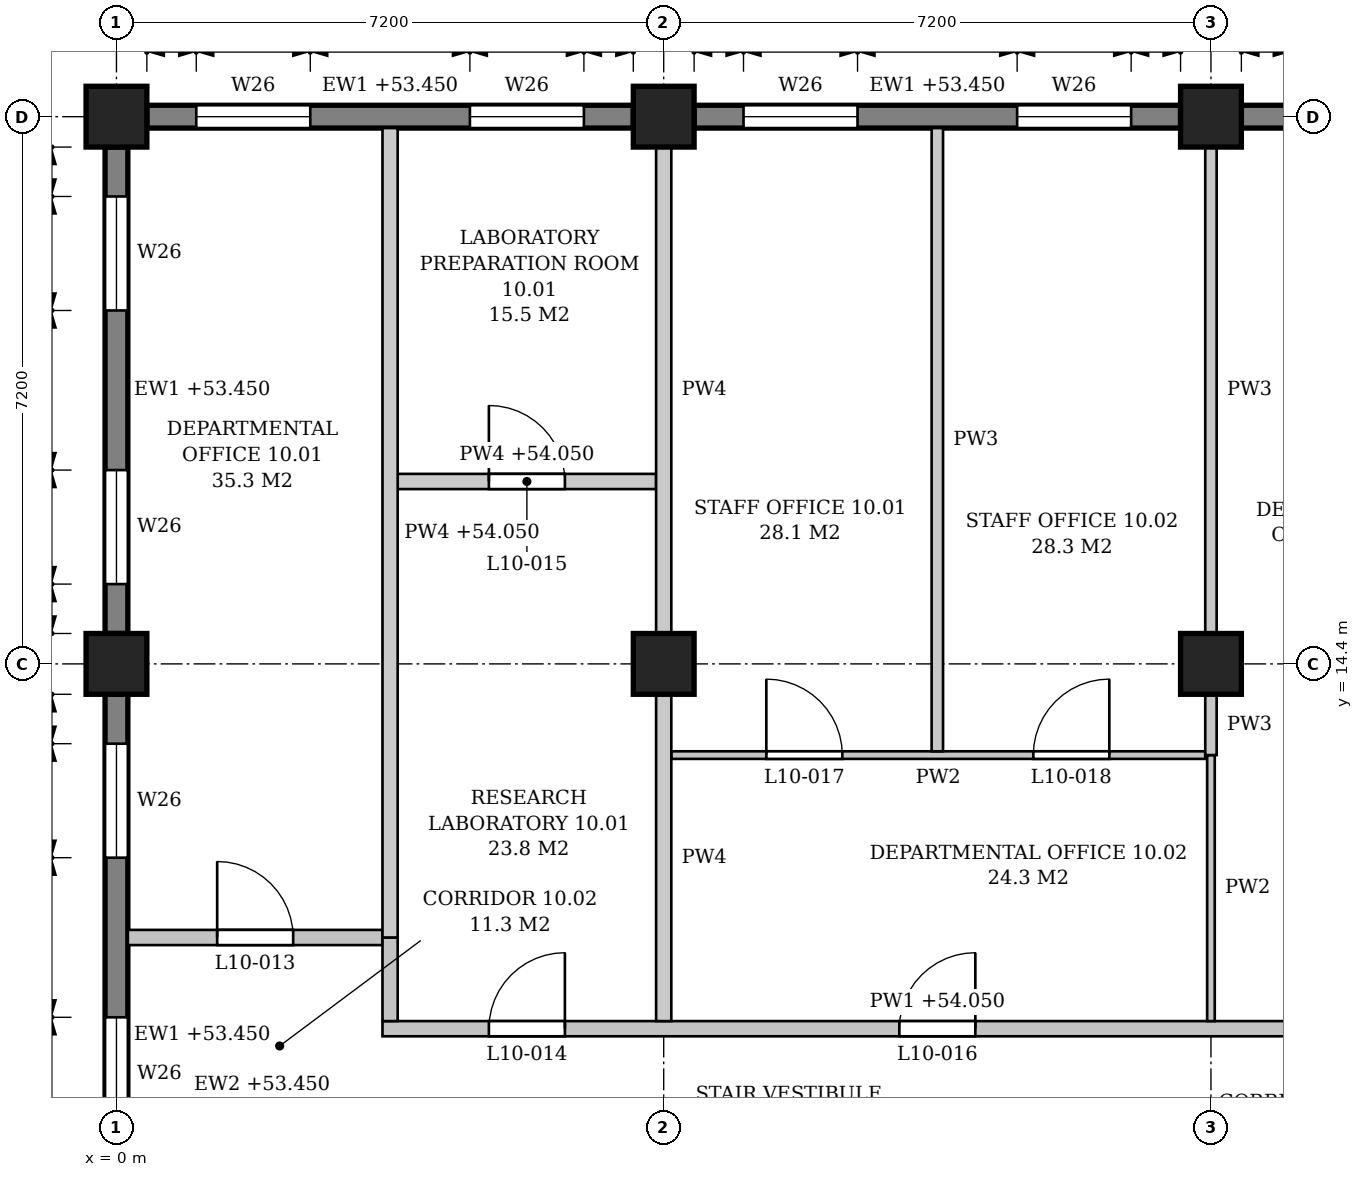
"""IFC4 building model, lengths in metres.
Left out: names, types, materials, properties, quantities, classifications, styles, units other than length and angle.
Written with IfcOpenShell. Run it as: python <this file> out.ifc"""

import sys

from ifc_helpers import new_model, si_unit, direction, frame, frame_2d, origin, origin_2d, place, context, subcontext, project, spatial, polyline, rectangle, outline, extrude, element, fill, save


model = new_model("IFC4")
c1 = context("Model", 3, precision=1e-05, world=origin(), true_north=direction((0.0, 1.0)))
c2 = subcontext(c1, "Body", "Model", "MODEL_VIEW")
j1 = project(units=[si_unit("LENGTHUNIT", "METRE"), si_unit("PLANEANGLEUNIT", "RADIAN")], contexts=[c1])
p1 = place(None, origin())
s1 = spatial("IfcSite", under=j1, at=p1, CompositionType="ELEMENT")
p2 = place(p1, origin())
s2 = spatial("IfcBuilding", under=s1, at=p2, CompositionType="ELEMENT")
p3 = place(p2, frame((0.0, 0.0, 49.8)))
s3 = spatial("IfcBuildingStorey", under=s2, at=p3, CompositionType="ELEMENT", Elevation=49.8)
for number, where, z_axis, x_axis in (
    (1, (0.0, 14.4, 0.0), (0.0, 0.0, 1.0), (1.0, 0.0, 0.0)),
    (2, (0.0, 21.6, 0.0), (0.0, 0.0, 1.0), (1.0, 0.0, 0.0)),
    (3, (7.2, 14.4, 0.0), (0.0, 0.0, 1.0), (1.0, 0.0, 0.0)),
    (4, (7.2, 21.6, 0.0), (0.0, 0.0, 1.0), (1.0, 0.0, 0.0)),
    (5, (14.4, 14.4, 0.0), (0.0, 0.0, 1.0), (1.0, 0.0, 0.0)),
    (6, (14.4, 21.6, 0.0), (0.0, 0.0, 1.0), (1.0, 0.0, 0.0)),
):
    element("IfcColumn", number, at=place(p3, frame(where, z_axis=z_axis, x_axis=x_axis)), inside=s3, PredefinedType="COLUMN", context=c2, shape_type="SweptSolid", body=[
        extrude(rectangle(XDim=0.8, YDim=0.8, at=origin_2d()), origin(), (0.0, 0.0, 1.0), 4.5),
    ])
p4 = place(p3, frame((0.0, 7.6, 0.0), z_axis=(0.0, 0.0, 1.0), x_axis=(0.0, 1.0, 0.0)))
e7 = element("IfcWall", 7, at=p4, inside=s3, PredefinedType="STANDARD", context=c2, shape_type="SweptSolid", body=[
    extrude(rectangle(XDim=6.4, YDim=0.3, at=frame_2d((3.2, 0.0))), origin(), (0.0, 0.0, 1.0), 3.65),
])
p5 = place(p4, frame((0.65, 0.0, 0.9)))
e8 = element("IfcOpeningElement", 8, at=p5, cuts=e7, PredefinedType="OPENING", context=c2, shape_type="SweptSolid", body=[
    extrude(outline(polyline([(0.0, 0.0), (1.5, 0.0), (1.5, 1.85), (0.75, 2.6), (0.0, 1.85), (0.0, 0.0)])), frame((0.0, 0.16, 0.0), z_axis=(0.0, -1.0, 0.0), x_axis=(1.0, 0.0, 0.0)), (0.0, 0.0, 1.0), 0.32),
])
p6 = place(p4, frame((4.25, 0.0, 0.9)))
e9 = element("IfcOpeningElement", 9, at=p6, cuts=e7, PredefinedType="OPENING", context=c2, shape_type="SweptSolid", body=[
    extrude(outline(polyline([(0.0, 0.0), (1.5, 0.0), (1.5, 1.85), (0.75, 2.6), (0.0, 1.85), (0.0, 0.0)])), frame((0.0, 0.16, 0.0), z_axis=(0.0, -1.0, 0.0), x_axis=(1.0, 0.0, 0.0)), (0.0, 0.0, 1.0), 0.32),
])
p7 = place(p3, frame((0.0, 14.8, 0.0), z_axis=(0.0, 0.0, 1.0), x_axis=(0.0, 1.0, 0.0)))
e10 = element("IfcWall", 10, at=p7, inside=s3, PredefinedType="STANDARD", context=c2, shape_type="SweptSolid", body=[
    extrude(rectangle(XDim=6.4, YDim=0.3, at=frame_2d((3.2, 0.0))), origin(), (0.0, 0.0, 1.0), 3.65),
])
p8 = place(p7, frame((0.65, 0.0, 0.9)))
e11 = element("IfcOpeningElement", 11, at=p8, cuts=e10, PredefinedType="OPENING", context=c2, shape_type="SweptSolid", body=[
    extrude(outline(polyline([(0.0, 0.0), (1.5, 0.0), (1.5, 1.85), (0.75, 2.6), (0.0, 1.85), (0.0, 0.0)])), frame((0.0, 0.16, 0.0), z_axis=(0.0, -1.0, 0.0), x_axis=(1.0, 0.0, 0.0)), (0.0, 0.0, 1.0), 0.32),
])
p9 = place(p7, frame((4.25, 0.0, 0.9)))
e12 = element("IfcOpeningElement", 12, at=p9, cuts=e10, PredefinedType="OPENING", context=c2, shape_type="SweptSolid", body=[
    extrude(outline(polyline([(0.0, 0.0), (1.5, 0.0), (1.5, 1.85), (0.75, 2.6), (0.0, 1.85), (0.0, 0.0)])), frame((0.0, 0.16, 0.0), z_axis=(0.0, -1.0, 0.0), x_axis=(1.0, 0.0, 0.0)), (0.0, 0.0, 1.0), 0.32),
])
p10 = place(p3, frame((21.2, 21.6, 0.0), z_axis=(0.0, 0.0, 1.0), x_axis=(-1.0, 0.0, 0.0)))
e13 = element("IfcWall", 13, at=p10, inside=s3, PredefinedType="STANDARD", context=c2, shape_type="SweptSolid", body=[
    extrude(rectangle(XDim=6.4, YDim=0.3, at=frame_2d((3.2, 0.0))), origin(), (0.0, 0.0, 1.0), 3.65),
])
p11 = place(p10, frame((0.65, 0.0, 0.9)))
e14 = element("IfcOpeningElement", 14, at=p11, cuts=e13, PredefinedType="OPENING", context=c2, shape_type="SweptSolid", body=[
    extrude(outline(polyline([(0.0, 0.0), (1.5, 0.0), (1.5, 1.85), (0.75, 2.6), (0.0, 1.85), (0.0, 0.0)])), frame((0.0, 0.16, 0.0), z_axis=(0.0, -1.0, 0.0), x_axis=(1.0, 0.0, 0.0)), (0.0, 0.0, 1.0), 0.32),
])
p12 = place(p10, frame((4.25, 0.0, 0.9)))
e15 = element("IfcOpeningElement", 15, at=p12, cuts=e13, PredefinedType="OPENING", context=c2, shape_type="SweptSolid", body=[
    extrude(outline(polyline([(0.0, 0.0), (1.5, 0.0), (1.5, 1.85), (0.75, 2.6), (0.0, 1.85), (0.0, 0.0)])), frame((0.0, 0.16, 0.0), z_axis=(0.0, -1.0, 0.0), x_axis=(1.0, 0.0, 0.0)), (0.0, 0.0, 1.0), 0.32),
])
p13 = place(p3, frame((14.0, 21.6, 0.0), z_axis=(0.0, 0.0, 1.0), x_axis=(-1.0, 0.0, 0.0)))
e16 = element("IfcWall", 16, at=p13, inside=s3, PredefinedType="STANDARD", context=c2, shape_type="SweptSolid", body=[
    extrude(rectangle(XDim=6.4, YDim=0.3, at=frame_2d((3.2, 0.0))), origin(), (0.0, 0.0, 1.0), 3.65),
])
p14 = place(p13, frame((0.65, 0.0, 0.9)))
e17 = element("IfcOpeningElement", 17, at=p14, cuts=e16, PredefinedType="OPENING", context=c2, shape_type="SweptSolid", body=[
    extrude(outline(polyline([(0.0, 0.0), (1.5, 0.0), (1.5, 1.85), (0.75, 2.6), (0.0, 1.85), (0.0, 0.0)])), frame((0.0, 0.16, 0.0), z_axis=(0.0, -1.0, 0.0), x_axis=(1.0, 0.0, 0.0)), (0.0, 0.0, 1.0), 0.32),
])
p15 = place(p13, frame((4.25, 0.0, 0.9)))
e18 = element("IfcOpeningElement", 18, at=p15, cuts=e16, PredefinedType="OPENING", context=c2, shape_type="SweptSolid", body=[
    extrude(outline(polyline([(0.0, 0.0), (1.5, 0.0), (1.5, 1.85), (0.75, 2.6), (0.0, 1.85), (0.0, 0.0)])), frame((0.0, 0.16, 0.0), z_axis=(0.0, -1.0, 0.0), x_axis=(1.0, 0.0, 0.0)), (0.0, 0.0, 1.0), 0.32),
])
p16 = place(p3, frame((6.8, 21.6, 0.0), z_axis=(0.0, 0.0, 1.0), x_axis=(-1.0, 0.0, 0.0)))
e19 = element("IfcWall", 19, at=p16, inside=s3, PredefinedType="STANDARD", context=c2, shape_type="SweptSolid", body=[
    extrude(rectangle(XDim=6.4, YDim=0.3, at=frame_2d((3.2, 0.0))), origin(), (0.0, 0.0, 1.0), 3.65),
])
p17 = place(p16, frame((0.65, 0.0, 0.9)))
e20 = element("IfcOpeningElement", 20, at=p17, cuts=e19, PredefinedType="OPENING", context=c2, shape_type="SweptSolid", body=[
    extrude(outline(polyline([(0.0, 0.0), (1.5, 0.0), (1.5, 1.85), (0.75, 2.6), (0.0, 1.85), (0.0, 0.0)])), frame((0.0, 0.16, 0.0), z_axis=(0.0, -1.0, 0.0), x_axis=(1.0, 0.0, 0.0)), (0.0, 0.0, 1.0), 0.32),
])
p18 = place(p16, frame((4.25, 0.0, 0.9)))
e21 = element("IfcOpeningElement", 21, at=p18, cuts=e19, PredefinedType="OPENING", context=c2, shape_type="SweptSolid", body=[
    extrude(outline(polyline([(0.0, 0.0), (1.5, 0.0), (1.5, 1.85), (0.75, 2.6), (0.0, 1.85), (0.0, 0.0)])), frame((0.0, 0.16, 0.0), z_axis=(0.0, -1.0, 0.0), x_axis=(1.0, 0.0, 0.0)), (0.0, 0.0, 1.0), 0.32),
])
p19 = place(p3, frame((3.5, 9.6, 0.0), z_axis=(0.0, 0.0, 1.0), x_axis=(1.0, 0.0, 0.0)))
e22 = element("IfcWall", 22, at=p19, inside=s3, PredefinedType="PARTITIONING", context=c2, shape_type="SweptSolid", body=[
    extrude(outline(polyline([(0.0, 0.0), (14.6, 0.0), (14.6, 4.25), (11.125, 4.25), (11.125, 3.55), (10.675, 3.55), (10.675, 4.25), (3.925, 4.25), (3.925, 3.55), (3.475, 3.55), (3.475, 4.25), (0.0, 4.25), (0.0, 0.0)])), frame((0.0, 0.1, 0.0), z_axis=(0.0, -1.0, 0.0), x_axis=(1.0, 0.0, 0.0)), (0.0, 0.0, 1.0), 0.2),
])
p20 = place(p19, frame((1.4, 0.0, 0.0)))
e23 = element("IfcOpeningElement", 23, at=p20, cuts=e22, PredefinedType="OPENING", context=c2, shape_type="SweptSolid", body=[
    extrude(rectangle(XDim=1.0, YDim=2.1, at=frame_2d((0.5, 1.05))), frame((0.0, 0.11, 0.0), z_axis=(0.0, -1.0, 0.0), x_axis=(1.0, 0.0, 0.0)), (0.0, 0.0, 1.0), 0.22),
])
p21 = place(p19, frame((6.8, 0.0, 0.0)))
e24 = element("IfcOpeningElement", 24, at=p21, cuts=e22, PredefinedType="OPENING", context=c2, shape_type="SweptSolid", body=[
    extrude(rectangle(XDim=1.0, YDim=2.1, at=frame_2d((0.5, 1.05))), frame((0.0, 0.11, 0.0), z_axis=(0.0, -1.0, 0.0), x_axis=(1.0, 0.0, 0.0)), (0.0, 0.0, 1.0), 0.22),
])
p22 = place(p3, frame((0.15, 10.8, 0.0), z_axis=(0.0, 0.0, 1.0), x_axis=(1.0, 0.0, 0.0)))
e25 = element("IfcWall", 25, at=p22, inside=s3, PredefinedType="PARTITIONING", context=c2, shape_type="SweptSolid", body=[
    extrude(outline(polyline([(0.0, 0.0), (3.35, 0.0), (3.35, 4.25), (0.05, 4.25), (0.05, 3.65), (0.0, 3.65), (0.0, 0.0)])), frame((0.0, 0.1, 0.0), z_axis=(0.0, -1.0, 0.0), x_axis=(1.0, 0.0, 0.0)), (0.0, 0.0, 1.0), 0.2),
])
p23 = place(p22, frame((1.175, 0.0, 0.0)))
e26 = element("IfcOpeningElement", 26, at=p23, cuts=e25, PredefinedType="OPENING", context=c2, shape_type="SweptSolid", body=[
    extrude(rectangle(XDim=1.0, YDim=2.1, at=frame_2d((0.5, 1.05))), frame((0.0, 0.11, 0.0), z_axis=(0.0, -1.0, 0.0), x_axis=(1.0, 0.0, 0.0)), (0.0, 0.0, 1.0), 0.22),
])
p24 = place(p3, frame((7.3, 13.2, 0.0), z_axis=(0.0, 0.0, 1.0), x_axis=(1.0, 0.0, 0.0)))
e27 = element("IfcWall", 27, at=p24, inside=s3, PredefinedType="PARTITIONING", context=c2, shape_type="SweptSolid", body=[
    extrude(rectangle(XDim=7.025, YDim=0.1, at=frame_2d((3.512, 0.0))), origin(), (0.0, 0.0, 1.0), 3.55),
])
p25 = place(p24, frame((1.25, 0.0, 0.0)))
e28 = element("IfcOpeningElement", 28, at=p25, cuts=e27, PredefinedType="OPENING", context=c2, shape_type="SweptSolid", body=[
    extrude(rectangle(XDim=1.0, YDim=2.1, at=frame_2d((0.5, 1.05))), frame((0.0, 0.06, 0.0), z_axis=(0.0, -1.0, 0.0), x_axis=(1.0, 0.0, 0.0)), (0.0, 0.0, 1.0), 0.12),
])
p26 = place(p24, frame((4.762, 0.0, 0.0)))
e29 = element("IfcOpeningElement", 29, at=p26, cuts=e27, PredefinedType="OPENING", context=c2, shape_type="SweptSolid", body=[
    extrude(rectangle(XDim=1.0, YDim=2.1, at=frame_2d((0.5, 1.05))), frame((0.0, 0.06, 0.0), z_axis=(0.0, -1.0, 0.0), x_axis=(1.0, 0.0, 0.0)), (0.0, 0.0, 1.0), 0.12),
])
p27 = place(p3, frame((3.7, 16.8, 0.0), z_axis=(0.0, 0.0, 1.0), x_axis=(1.0, 0.0, 0.0)))
e30 = element("IfcWall", 30, at=p27, inside=s3, PredefinedType="PARTITIONING", context=c2, shape_type="SweptSolid", body=[
    extrude(outline(polyline([(0.0, 0.0), (3.4, 0.0), (3.4, 3.55), (3.275, 3.55), (3.275, 4.25), (0.0, 4.25), (0.0, 0.0)])), frame((0.0, 0.1, 0.0), z_axis=(0.0, -1.0, 0.0), x_axis=(1.0, 0.0, 0.0)), (0.0, 0.0, 1.0), 0.2),
])
p28 = place(p27, frame((1.2, 0.0, 0.0)))
e31 = element("IfcOpeningElement", 31, at=p28, cuts=e30, PredefinedType="OPENING", context=c2, shape_type="SweptSolid", body=[
    extrude(rectangle(XDim=1.0, YDim=2.1, at=frame_2d((0.5, 1.05))), frame((0.0, 0.11, 0.0), z_axis=(0.0, -1.0, 0.0), x_axis=(1.0, 0.0, 0.0)), (0.0, 0.0, 1.0), 0.22),
])
p29 = place(p3, frame((3.6, 9.7, 0.0), z_axis=(0.0, 0.0, 1.0), x_axis=(0.0, 1.0, 0.0)))
e32 = element("IfcWall", 32, at=p29, inside=s3, PredefinedType="PARTITIONING", context=c2, shape_type="SweptSolid", body=[
    extrude(rectangle(XDim=1.1, YDim=0.2, at=frame_2d((0.55, 0.0))), origin(), (0.0, 0.0, 1.0), 4.25),
])
p30 = place(p3, frame((3.6, 10.8, 0.0), z_axis=(0.0, 0.0, 1.0), x_axis=(0.0, 1.0, 0.0)))
e33 = element("IfcWall", 33, at=p30, inside=s3, PredefinedType="PARTITIONING", context=c2, shape_type="SweptSolid", body=[
    extrude(outline(polyline([(0.0, 0.0), (10.65, 0.0), (10.6, 4.25), (3.8, 4.25), (3.8, 3.65), (3.4, 3.65), (3.4, 4.25), (0.0, 4.25), (0.0, 0.0)])), frame((0.0, 0.1, 0.0), z_axis=(0.0, -1.0, 0.0), x_axis=(1.0, 0.0, 0.0)), (0.0, 0.0, 1.0), 0.2),
])
p31 = place(p3, frame((7.2, 9.7, 0.0), z_axis=(0.0, 0.0, 1.0), x_axis=(0.0, 1.0, 0.0)))
e34 = element("IfcWall", 34, at=p31, inside=s3, PredefinedType="PARTITIONING", context=c2, shape_type="SweptSolid", body=[
    extrude(rectangle(XDim=4.3, YDim=0.2, at=frame_2d((2.15, 0.0))), origin(), (0.0, 0.0, 1.0), 3.55),
])
p32 = place(p3, frame((7.2, 14.8, 0.0), z_axis=(0.0, 0.0, 1.0), x_axis=(0.0, 1.0, 0.0)))
e35 = element("IfcWall", 35, at=p32, inside=s3, PredefinedType="PARTITIONING", context=c2, shape_type="SweptSolid", body=[
    extrude(rectangle(XDim=6.4, YDim=0.2, at=frame_2d((3.2, 0.0))), origin(), (0.0, 0.0, 1.0), 3.55),
])
p33 = place(p3, frame((10.8, 13.25, 0.0), z_axis=(0.0, 0.0, 1.0), x_axis=(0.0, 1.0, 0.0)))
e36 = element("IfcWall", 36, at=p33, inside=s3, PredefinedType="PARTITIONING", context=c2, shape_type="SweptSolid", body=[
    extrude(rectangle(XDim=8.2, YDim=0.15, at=frame_2d((4.1, 0.0))), origin(), (0.0, 0.0, 1.0), 3.55),
])
p34 = place(p3, frame((14.4, 9.7, 0.0), z_axis=(0.0, 0.0, 1.0), x_axis=(0.0, 1.0, 0.0)))
e37 = element("IfcWall", 37, at=p34, inside=s3, PredefinedType="PARTITIONING", context=c2, shape_type="SweptSolid", body=[
    extrude(rectangle(XDim=3.5, YDim=0.1, at=frame_2d((1.75, 0.0))), origin(), (0.0, 0.0, 1.0), 3.55),
])
p35 = place(p3, frame((14.4, 13.2, 0.0), z_axis=(0.0, 0.0, 1.0), x_axis=(0.0, 1.0, 0.0)))
e38 = element("IfcWall", 38, at=p35, inside=s3, PredefinedType="PARTITIONING", context=c2, shape_type="SweptSolid", body=[
    extrude(rectangle(XDim=0.8, YDim=0.15, at=frame_2d((0.4, 0.0))), origin(), (0.0, 0.0, 1.0), 3.55),
])
p36 = place(p3, frame((14.4, 14.8, 0.0), z_axis=(0.0, 0.0, 1.0), x_axis=(0.0, 1.0, 0.0)))
e39 = element("IfcWall", 39, at=p36, inside=s3, PredefinedType="PARTITIONING", context=c2, shape_type="SweptSolid", body=[
    extrude(rectangle(XDim=6.4, YDim=0.15, at=frame_2d((3.2, 0.0))), origin(), (0.0, 0.0, 1.0), 3.55),
])
p37 = place(p14, origin())
e40 = element("IfcWindow", 40, at=p37, inside=s3, PartitioningType="SINGLE_PANEL", PredefinedType="WINDOW", context=c2, shape_type="SweptSolid", body=[
    extrude(outline(polyline([(0.0, 0.0), (1.5, 0.0), (1.5, 1.85), (0.75, 2.6), (0.0, 1.85), (0.0, 0.0)])), frame((0.0, 0.03, 0.0), z_axis=(0.0, -1.0, 0.0), x_axis=(1.0, 0.0, 0.0)), (0.0, 0.0, 1.0), 0.06),
])
fill(e17, e40)
p38 = place(p15, origin())
e41 = element("IfcWindow", 41, at=p38, inside=s3, PartitioningType="SINGLE_PANEL", PredefinedType="WINDOW", context=c2, shape_type="SweptSolid", body=[
    extrude(outline(polyline([(0.0, 0.0), (1.5, 0.0), (1.5, 1.85), (0.75, 2.6), (0.0, 1.85), (0.0, 0.0)])), frame((0.0, 0.03, 0.0), z_axis=(0.0, -1.0, 0.0), x_axis=(1.0, 0.0, 0.0)), (0.0, 0.0, 1.0), 0.06),
])
fill(e18, e41)
p39 = place(p17, origin())
e42 = element("IfcWindow", 42, at=p39, inside=s3, PartitioningType="SINGLE_PANEL", PredefinedType="WINDOW", context=c2, shape_type="SweptSolid", body=[
    extrude(outline(polyline([(0.0, 0.0), (1.5, 0.0), (1.5, 1.85), (0.75, 2.6), (0.0, 1.85), (0.0, 0.0)])), frame((0.0, 0.03, 0.0), z_axis=(0.0, -1.0, 0.0), x_axis=(1.0, 0.0, 0.0)), (0.0, 0.0, 1.0), 0.06),
])
fill(e20, e42)
p40 = place(p18, origin())
e43 = element("IfcWindow", 43, at=p40, inside=s3, PartitioningType="SINGLE_PANEL", PredefinedType="WINDOW", context=c2, shape_type="SweptSolid", body=[
    extrude(outline(polyline([(0.0, 0.0), (1.5, 0.0), (1.5, 1.85), (0.75, 2.6), (0.0, 1.85), (0.0, 0.0)])), frame((0.0, 0.03, 0.0), z_axis=(0.0, -1.0, 0.0), x_axis=(1.0, 0.0, 0.0)), (0.0, 0.0, 1.0), 0.06),
])
fill(e21, e43)
p41 = place(p5, origin())
e44 = element("IfcWindow", 44, at=p41, inside=s3, PartitioningType="SINGLE_PANEL", PredefinedType="WINDOW", context=c2, shape_type="SweptSolid", body=[
    extrude(outline(polyline([(0.0, 0.0), (1.5, 0.0), (1.5, 1.85), (0.75, 2.6), (0.0, 1.85), (0.0, 0.0)])), frame((0.0, 0.03, 0.0), z_axis=(0.0, -1.0, 0.0), x_axis=(1.0, 0.0, 0.0)), (0.0, 0.0, 1.0), 0.06),
])
fill(e8, e44)
p42 = place(p6, origin())
e45 = element("IfcWindow", 45, at=p42, inside=s3, PartitioningType="SINGLE_PANEL", PredefinedType="WINDOW", context=c2, shape_type="SweptSolid", body=[
    extrude(outline(polyline([(0.0, 0.0), (1.5, 0.0), (1.5, 1.85), (0.75, 2.6), (0.0, 1.85), (0.0, 0.0)])), frame((0.0, 0.03, 0.0), z_axis=(0.0, -1.0, 0.0), x_axis=(1.0, 0.0, 0.0)), (0.0, 0.0, 1.0), 0.06),
])
fill(e9, e45)
p43 = place(p8, origin())
e46 = element("IfcWindow", 46, at=p43, inside=s3, PartitioningType="SINGLE_PANEL", PredefinedType="WINDOW", context=c2, shape_type="SweptSolid", body=[
    extrude(outline(polyline([(0.0, 0.0), (1.5, 0.0), (1.5, 1.85), (0.75, 2.6), (0.0, 1.85), (0.0, 0.0)])), frame((0.0, 0.03, 0.0), z_axis=(0.0, -1.0, 0.0), x_axis=(1.0, 0.0, 0.0)), (0.0, 0.0, 1.0), 0.06),
])
fill(e11, e46)
p44 = place(p9, origin())
e47 = element("IfcWindow", 47, at=p44, inside=s3, PartitioningType="SINGLE_PANEL", PredefinedType="WINDOW", context=c2, shape_type="SweptSolid", body=[
    extrude(outline(polyline([(0.0, 0.0), (1.5, 0.0), (1.5, 1.85), (0.75, 2.6), (0.0, 1.85), (0.0, 0.0)])), frame((0.0, 0.03, 0.0), z_axis=(0.0, -1.0, 0.0), x_axis=(1.0, 0.0, 0.0)), (0.0, 0.0, 1.0), 0.06),
])
fill(e12, e47)
p45 = place(p23, origin())
e48 = element("IfcDoor", 48, at=p45, inside=s3, OperationType="SINGLE_SWING_LEFT", PredefinedType="DOOR", context=c2, shape_type="SweptSolid", body=[
    extrude(rectangle(XDim=1.0, YDim=2.1, at=frame_2d((0.5, 1.05))), frame((0.0, 0.025, 0.0), z_axis=(0.0, -1.0, 0.0), x_axis=(1.0, 0.0, 0.0)), (0.0, 0.0, 1.0), 0.05),
])
fill(e26, e48)
p46 = place(p20, origin())
e49 = element("IfcDoor", 49, at=p46, inside=s3, OperationType="SINGLE_SWING_RIGHT", PredefinedType="DOOR", context=c2, shape_type="SweptSolid", body=[
    extrude(rectangle(XDim=1.0, YDim=2.1, at=frame_2d((0.5, 1.05))), frame((0.0, 0.025, 0.0), z_axis=(0.0, -1.0, 0.0), x_axis=(1.0, 0.0, 0.0)), (0.0, 0.0, 1.0), 0.05),
])
fill(e23, e49)
p47 = place(p28, origin())
e50 = element("IfcDoor", 50, at=p47, inside=s3, OperationType="SINGLE_SWING_LEFT", PredefinedType="DOOR", context=c2, shape_type="SweptSolid", body=[
    extrude(rectangle(XDim=1.0, YDim=2.1, at=frame_2d((0.5, 1.05))), frame((0.0, 0.025, 0.0), z_axis=(0.0, -1.0, 0.0), x_axis=(1.0, 0.0, 0.0)), (0.0, 0.0, 1.0), 0.05),
])
fill(e31, e50)
p48 = place(p21, origin())
e51 = element("IfcDoor", 51, at=p48, inside=s3, OperationType="SINGLE_SWING_RIGHT", PredefinedType="DOOR", context=c2, shape_type="SweptSolid", body=[
    extrude(rectangle(XDim=1.0, YDim=2.1, at=frame_2d((0.5, 1.05))), frame((0.0, 0.025, 0.0), z_axis=(0.0, -1.0, 0.0), x_axis=(1.0, 0.0, 0.0)), (0.0, 0.0, 1.0), 0.05),
])
fill(e24, e51)
p49 = place(p25, origin())
e52 = element("IfcDoor", 52, at=p49, inside=s3, OperationType="SINGLE_SWING_LEFT", PredefinedType="DOOR", context=c2, shape_type="SweptSolid", body=[
    extrude(rectangle(XDim=1.0, YDim=2.1, at=frame_2d((0.5, 1.05))), frame((0.0, 0.025, 0.0), z_axis=(0.0, -1.0, 0.0), x_axis=(1.0, 0.0, 0.0)), (0.0, 0.0, 1.0), 0.05),
])
fill(e28, e52)
p50 = place(p26, origin())
e53 = element("IfcDoor", 53, at=p50, inside=s3, OperationType="SINGLE_SWING_RIGHT", PredefinedType="DOOR", context=c2, shape_type="SweptSolid", body=[
    extrude(rectangle(XDim=1.0, YDim=2.1, at=frame_2d((0.5, 1.05))), frame((0.0, 0.025, 0.0), z_axis=(0.0, -1.0, 0.0), x_axis=(1.0, 0.0, 0.0)), (0.0, 0.0, 1.0), 0.05),
])
fill(e29, e53)
save(model, sys.argv[1])
